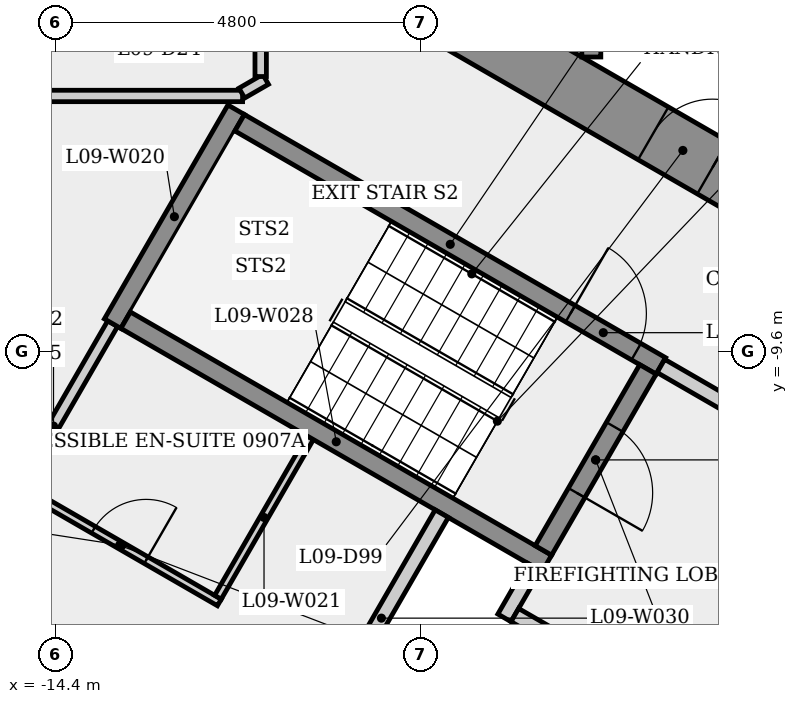
"""IFC4 building model, lengths in metres.
Left out: names, types, materials, properties, quantities, classifications, styles, units other than length and angle.
Written with IfcOpenShell. Run it as: python <this file> out.ifc"""

import sys

from ifc_helpers import new_model, si_unit, direction, frame, frame_2d, origin, place, context, subcontext, project, spatial, rectangle, extrude, element, fill, save


model = new_model("IFC4")
c1 = context("Model", 3, precision=1e-05, world=origin(), true_north=direction((0.0, 1.0)))
c2 = subcontext(c1, "Body", "Model", "MODEL_VIEW")
j1 = project(units=[si_unit("LENGTHUNIT", "METRE"), si_unit("PLANEANGLEUNIT", "RADIAN")], contexts=[c1])
p1 = place(None, origin())
s1 = spatial("IfcSite", under=j1, at=p1, CompositionType="ELEMENT")
p2 = place(p1, origin())
s2 = spatial("IfcBuilding", under=s1, at=p2, CompositionType="ELEMENT")
p3 = place(p2, frame((0.0, 0.0, 39.1)))
s3 = spatial("IfcBuildingStorey", under=s2, at=p3, CompositionType="ELEMENT", Elevation=39.1)
p4 = place(p3, frame((-9.3, -5.138, 0.0), z_axis=(0.0, 0.0, 1.0), x_axis=(0.866023993627, -0.500002442456, 0.0)))
e1 = element("IfcWall", 1, at=p4, inside=s3, PredefinedType="SHEAR", context=c2, shape_type="SweptSolid", body=[
    extrude(rectangle(XDim=10.97, YDim=0.8, at=frame_2d((5.485, 0.0))), origin(), (0.0, 0.0, 1.0), 3.4),
])
p5 = place(p4, frame((3.192, 0.0, 0.0)))
e2 = element("IfcOpeningElement", 2, at=p5, cuts=e1, PredefinedType="OPENING", context=c2, shape_type="SweptSolid", body=[
    extrude(rectangle(XDim=0.9, YDim=2.1, at=frame_2d((0.45, 1.05))), frame((0.0, 0.41, 0.0), z_axis=(0.0, -1.0, 0.0), x_axis=(1.0, 0.0, 0.0)), (0.0, 0.0, 1.0), 0.82),
])
p6 = place(p3, frame((-18.639, -6.243, 0.0), z_axis=(0.0, 0.0, 1.0), x_axis=(1.0, 0.0, 0.0)))
e3 = element("IfcWall", 3, at=p6, inside=s3, PredefinedType="PARTITIONING", context=c2, shape_type="SweptSolid", body=[
    extrude(rectangle(XDim=6.701, YDim=0.15, at=frame_2d((3.351, 0.0))), origin(), (0.0, 0.0, 1.0), 3.05),
])
p7 = place(p6, frame((2.918, 0.0, 0.0)))
e4 = element("IfcOpeningElement", 4, at=p7, cuts=e3, PredefinedType="OPENING", context=c2, shape_type="SweptSolid", body=[
    extrude(rectangle(XDim=0.9, YDim=2.1, at=frame_2d((0.45, 1.05))), frame((0.0, 0.085, 0.0), z_axis=(0.0, -1.0, 0.0), x_axis=(1.0, 0.0, 0.0)), (0.0, 0.0, 1.0), 0.17),
])
p8 = place(p3, frame((-14.82, -11.42, 0.0), z_axis=(0.0, 0.0, 1.0), x_axis=(0.866017493347, -0.500013701029, 0.0)))
e5 = element("IfcWall", 5, at=p8, inside=s3, PredefinedType="PARTITIONING", context=c2, shape_type="SweptSolid", body=[
    extrude(rectangle(XDim=2.975, YDim=0.1, at=frame_2d((1.488, 0.0))), origin(), (0.0, 0.0, 1.0), 3.05),
])
p9 = place(p8, frame((1.062, 0.0, 0.0)))
e6 = element("IfcOpeningElement", 6, at=p9, cuts=e5, PredefinedType="OPENING", context=c2, shape_type="SweptSolid", body=[
    extrude(rectangle(XDim=0.8, YDim=2.1, at=frame_2d((0.4, 1.05))), frame((0.0, 0.06, 0.0), z_axis=(0.0, -1.0, 0.0), x_axis=(1.0, 0.0, 0.0)), (0.0, 0.0, 1.0), 0.12),
])
p10 = place(p3, frame((-15.204, -11.934, 0.0), z_axis=(0.0, 0.0, 1.0), x_axis=(0.500037089193, 0.86600398927, 0.0)))
e7 = element("IfcWall", 7, at=p10, inside=s3, PredefinedType="PARTITIONING", context=c2, shape_type="SweptSolid", body=[
    extrude(rectangle(XDim=3.112, YDim=0.15, at=frame_2d((1.556, 0.0))), origin(), (0.0, 0.0, 1.0), 3.05),
])
p11 = place(p3, frame((-13.648, -9.239, 0.0), z_axis=(0.0, 0.0, 1.0), x_axis=(0.500017246033, 0.866015446554, 0.0)))
e8 = element("IfcWall", 8, at=p11, inside=s3, PredefinedType="SHEAR", context=c2, shape_type="SweptSolid", body=[
    extrude(rectangle(XDim=3.25, YDim=0.25, at=frame_2d((1.625, 0.0))), origin(), (0.0, 0.0, 1.0), 3.05),
])
p12 = place(p3, frame((-12.262, -12.839, 0.0), z_axis=(0.0, 0.0, 1.0), x_axis=(0.499972286653, 0.866041403502, 0.0)))
e9 = element("IfcWall", 9, at=p12, inside=s3, PredefinedType="PARTITIONING", context=c2, shape_type="SweptSolid", body=[
    extrude(rectangle(XDim=2.425, YDim=0.1, at=frame_2d((1.212, 0.0))), origin(), (0.0, 0.0, 1.0), 3.05),
])
p13 = place(p3, frame((-11.977, -6.595, 0.0), z_axis=(0.0, 0.0, 1.0), x_axis=(0.866025499775, -0.499999833739, 0.0)))
e10 = element("IfcWall", 10, at=p13, inside=s3, PredefinedType="SHEAR", context=c2, shape_type="SweptSolid", body=[
    extrude(rectangle(XDim=6.4, YDim=0.25, at=frame_2d((3.2, 0.0))), origin(), (0.0, 0.0, 1.0), 3.05),
])
p14 = place(p13, frame((5.025, 0.0, 0.0)))
e11 = element("IfcOpeningElement", 11, at=p14, cuts=e10, PredefinedType="OPENING", context=c2, shape_type="SweptSolid", body=[
    extrude(rectangle(XDim=1.0, YDim=2.1, at=frame_2d((0.5, 1.05))), frame((0.0, 0.135, 0.0), z_axis=(0.0, -1.0, 0.0), x_axis=(1.0, 0.0, 0.0)), (0.0, 0.0, 1.0), 0.27),
])
p15 = place(p3, frame((-11.948, -6.206, 0.0), z_axis=(0.0, 0.0, 1.0), x_axis=(0.865949522258, 0.500131407633, 0.0)))
e12 = element("IfcWall", 12, at=p15, inside=s3, PredefinedType="PARTITIONING", context=c2, shape_type="SweptSolid", body=[
    extrude(rectangle(XDim=0.362, YDim=0.15, at=frame_2d((0.181, 0.0))), origin(), (0.0, 0.0, 1.0), 3.05),
])
p16 = place(p3, frame((-11.7, -5.987, 0.0), z_axis=(0.0, 0.0, 1.0), x_axis=(0.0, 1.0, 0.0)))
e13 = element("IfcWall", 13, at=p16, inside=s3, PredefinedType="PARTITIONING", context=c2, shape_type="SweptSolid", body=[
    extrude(rectangle(XDim=11.975, YDim=0.15, at=frame_2d((5.987, 0.0))), origin(), (0.0, 0.0, 1.0), 3.05),
])
p17 = place(p16, frame((7.455, 0.0, 0.0)))
e14 = element("IfcOpeningElement", 14, at=p17, cuts=e13, PredefinedType="OPENING", context=c2, shape_type="SweptSolid", body=[
    extrude(rectangle(XDim=1.0, YDim=2.1, at=frame_2d((0.5, 1.05))), frame((0.0, 0.085, 0.0), z_axis=(0.0, -1.0, 0.0), x_axis=(1.0, 0.0, 0.0)), (0.0, 0.0, 1.0), 0.17),
])
p18 = place(p3, frame((-13.477, -9.193, 0.0), z_axis=(0.0, 0.0, 1.0), x_axis=(0.866025499775, -0.499999833739, 0.0)))
e15 = element("IfcWall", 15, at=p18, inside=s3, PredefinedType="SHEAR", context=c2, shape_type="SweptSolid", body=[
    extrude(rectangle(XDim=6.4, YDim=0.25, at=frame_2d((3.2, 0.0))), origin(), (0.0, 0.0, 1.0), 3.05),
])
p19 = place(p3, frame((-10.905, -14.489, 0.0), z_axis=(0.0, 0.0, 1.0), x_axis=(0.499959856469, 0.866048579423, 0.0)))
e16 = element("IfcWall", 16, at=p19, inside=s3, PredefinedType="PLUMBINGWALL", context=c2, shape_type="SweptSolid", body=[
    extrude(rectangle(XDim=3.175, YDim=0.2, at=frame_2d((1.587, 0.0))), origin(), (0.0, 0.0, 1.0), 3.05),
])
p20 = place(p3, frame((-8.493, -13.11, 0.0), z_axis=(0.0, 0.0, 1.0), x_axis=(0.500067724834, 0.865986299303, 0.0)))
e17 = element("IfcWall", 17, at=p20, inside=s3, PredefinedType="PLUMBINGWALL", context=c2, shape_type="SweptSolid", body=[
    extrude(rectangle(XDim=0.775, YDim=0.2, at=frame_2d((0.388, 0.0))), origin(), (0.0, 0.0, 1.0), 3.05),
])
p21 = place(p3, frame((-7.836, -13.373, 0.0), z_axis=(0.0, 0.0, 1.0), x_axis=(-0.866232998003, 0.499640263761, 0.0)))
e18 = element("IfcWall", 18, at=p21, inside=s3, PredefinedType="PLUMBINGWALL", context=c2, shape_type="SweptSolid", body=[
    extrude(rectangle(XDim=0.6, YDim=0.2, at=frame_2d((0.3, 0.0))), origin(), (0.0, 0.0, 1.0), 3.05),
])
p22 = place(p3, frame((-7.35, -5.73, 0.0), z_axis=(0.0, 0.0, 1.0), x_axis=(0.0, 1.0, 0.0)))
e19 = element("IfcWall", 19, at=p22, inside=s3, PredefinedType="SHEAR", context=c2, shape_type="SweptSolid", body=[
    extrude(rectangle(XDim=4.055, YDim=0.25, at=frame_2d((2.028, 0.0))), origin(), (0.0, 0.0, 1.0), 3.05),
])
p23 = place(p3, frame((-6.605, -9.841, 0.0), z_axis=(0.0, 0.0, 1.0), x_axis=(-0.499996545922, -0.866027397988, 0.0)))
e20 = element("IfcWall", 20, at=p23, inside=s3, PredefinedType="SHEAR", context=c2, shape_type="SweptSolid", body=[
    extrude(rectangle(XDim=2.75, YDim=0.25, at=frame_2d((1.375, 0.0))), origin(), (0.0, 0.0, 1.0), 3.05),
])
p24 = place(p23, frame((0.875, 0.0, 0.0)))
e21 = element("IfcOpeningElement", 21, at=p24, cuts=e20, PredefinedType="OPENING", context=c2, shape_type="SweptSolid", body=[
    extrude(rectangle(XDim=1.0, YDim=2.1, at=frame_2d((0.5, 1.05))), frame((0.0, 0.135, 0.0), z_axis=(0.0, -1.0, 0.0), x_axis=(1.0, 0.0, 0.0)), (0.0, 0.0, 1.0), 0.27),
])
p25 = place(p3, frame((-6.435, -9.795, 0.0), z_axis=(0.0, 0.0, 1.0), x_axis=(0.866012907634, -0.500021643343, 0.0)))
e22 = element("IfcWall", 22, at=p25, inside=s3, PredefinedType="PARTITIONING", context=c2, shape_type="SweptSolid", body=[
    extrude(rectangle(XDim=4.45, YDim=0.2, at=frame_2d((2.225, 0.0))), origin(), (0.0, 0.0, 1.0), 3.05),
])
p26 = place(p25, frame((1.675, 0.0, 0.0)))
e23 = element("IfcOpeningElement", 23, at=p26, cuts=e22, PredefinedType="OPENING", context=c2, shape_type="SweptSolid", body=[
    extrude(rectangle(XDim=1.1, YDim=2.1, at=frame_2d((0.55, 1.05))), frame((0.0, 0.11, 0.0), z_axis=(0.0, -1.0, 0.0), x_axis=(1.0, 0.0, 0.0)), (0.0, 0.0, 1.0), 0.22),
])
p27 = place(p14, origin())
e24 = element("IfcDoor", 24, at=p27, inside=s3, OperationType="SINGLE_SWING_LEFT", PredefinedType="DOOR", context=c2, shape_type="SweptSolid", body=[
    extrude(rectangle(XDim=1.0, YDim=2.1, at=frame_2d((0.5, 1.05))), frame((0.0, 0.025, 0.0), z_axis=(0.0, -1.0, 0.0), x_axis=(1.0, 0.0, 0.0)), (0.0, 0.0, 1.0), 0.05),
])
fill(e11, e24)
p28 = place(p24, origin())
e25 = element("IfcDoor", 25, at=p28, inside=s3, OperationType="SINGLE_SWING_RIGHT", PredefinedType="DOOR", context=c2, shape_type="SweptSolid", body=[
    extrude(rectangle(XDim=1.0, YDim=2.1, at=frame_2d((0.5, 1.05))), frame((0.0, 0.025, 0.0), z_axis=(0.0, -1.0, 0.0), x_axis=(1.0, 0.0, 0.0)), (0.0, 0.0, 1.0), 0.05),
])
fill(e21, e25)
p29 = place(p9, origin())
e26 = element("IfcDoor", 26, at=p29, inside=s3, OperationType="SINGLE_SWING_RIGHT", PredefinedType="DOOR", context=c2, shape_type="SweptSolid", body=[
    extrude(rectangle(XDim=0.8, YDim=2.1, at=frame_2d((0.4, 1.05))), frame((0.0, 0.025, 0.0), z_axis=(0.0, -1.0, 0.0), x_axis=(1.0, 0.0, 0.0)), (0.0, 0.0, 1.0), 0.05),
])
fill(e6, e26)
p30 = place(p5, origin())
e27 = element("IfcDoor", 27, at=p30, inside=s3, OperationType="SINGLE_SWING_RIGHT", PredefinedType="DOOR", context=c2, shape_type="SweptSolid", body=[
    extrude(rectangle(XDim=0.9, YDim=2.1, at=frame_2d((0.45, 1.05))), frame((0.0, 0.025, 0.0), z_axis=(0.0, -1.0, 0.0), x_axis=(1.0, 0.0, 0.0)), (0.0, 0.0, 1.0), 0.05),
])
fill(e2, e27)
save(model, sys.argv[1])
